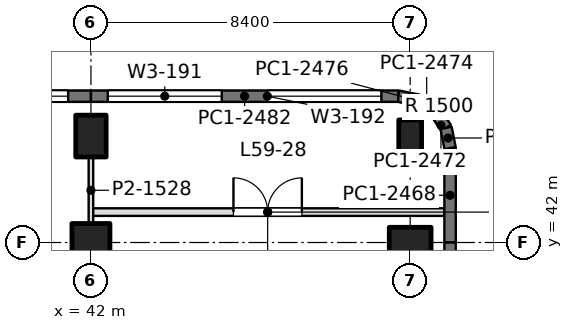
"""IFC4 building model, lengths in metres.
Left out: names, types, materials, properties, quantities, classifications, styles, units other than length and angle.
Written with IfcOpenShell. Run it as: python <this file> out.ifc"""

import sys

from ifc_helpers import new_model, si_unit, direction, frame, frame_2d, origin, origin_2d, place, context, subcontext, project, spatial, rectangle, extrude, element, fill, save


model = new_model("IFC4")
c1 = context("Model", 3, precision=1e-05, world=origin(), true_north=direction((0.0, 1.0)))
c2 = subcontext(c1, "Body", "Model", "MODEL_VIEW")
j1 = project(units=[si_unit("LENGTHUNIT", "METRE"), si_unit("PLANEANGLEUNIT", "RADIAN")], contexts=[c1])
p1 = place(None, origin())
s1 = spatial("IfcSite", under=j1, at=p1, CompositionType="ELEMENT")
p2 = place(p1, origin())
s2 = spatial("IfcBuilding", under=s1, at=p2, CompositionType="ELEMENT")
p3 = place(p2, frame((0.0, 0.0, 259.2)))
s3 = spatial("IfcBuildingStorey", under=s2, at=p3, CompositionType="ELEMENT", Elevation=259.2)
p4 = place(p3, frame((42.0, 42.0, 0.0), z_axis=(0.0, 0.0, 1.0), x_axis=(1.0, 0.0, 0.0)))
e1 = element("IfcColumn", 1, at=p4, inside=s3, PredefinedType="COLUMN", context=c2, shape_type="SweptSolid", body=[
    extrude(rectangle(XDim=1.0, YDim=1.0, at=origin_2d()), origin(), (0.0, 0.0, 1.0), 4.5),
])
for number, where, z_axis, x_axis in (
    (2, (42.0, 44.8, 0.0), (0.0, 0.0, 1.0), (1.0, 0.0, 0.0)),
    (3, (50.4, 42.0, 0.0), (0.0, 0.0, 1.0), (0.0, 1.0, 0.0)),
):
    element("IfcColumn", number, at=place(p3, frame(where, z_axis=z_axis, x_axis=x_axis)), inside=s3, PredefinedType="COLUMN", context=c2, shape_type="SweptSolid", body=[
        extrude(rectangle(XDim=0.8, YDim=1.1, at=origin_2d()), origin(), (0.0, 0.0, 1.0), 4.5),
    ])
p5 = place(p3, frame((50.4, 44.8, 0.0), z_axis=(0.0, 0.0, 1.0), x_axis=(1.0, 0.0, 0.0)))
e4 = element("IfcColumn", 4, at=p5, inside=s3, PredefinedType="COLUMN", context=c2, shape_type="SweptSolid", body=[
    extrude(rectangle(XDim=0.6, YDim=0.85, at=origin_2d()), origin(), (0.0, 0.0, 1.0), 4.5),
])
p6 = place(p3, frame((33.6, 45.85, 0.0), z_axis=(0.0, 0.0, 1.0), x_axis=(1.0, 0.0, 0.0)))
e5 = element("IfcWall", 5, at=p6, inside=s3, PredefinedType="SOLIDWALL", context=c2, shape_type="SweptSolid", body=[
    extrude(rectangle(XDim=8.4, YDim=0.3, at=frame_2d((4.2, 0.0))), origin(), (0.0, 0.0, 1.0), 4.35),
])
p7 = place(p6, frame((0.6, 0.0, 0.9)))
e6 = element("IfcOpeningElement", 6, at=p7, cuts=e5, PredefinedType="OPENING", context=c2, shape_type="SweptSolid", body=[
    extrude(rectangle(XDim=3.0, YDim=2.4, at=frame_2d((1.5, 1.2))), frame((0.0, 0.16, 0.0), z_axis=(0.0, -1.0, 0.0), x_axis=(1.0, 0.0, 0.0)), (0.0, 0.0, 1.0), 0.32),
])
p8 = place(p6, frame((4.8, 0.0, 0.9)))
e7 = element("IfcOpeningElement", 7, at=p8, cuts=e5, PredefinedType="OPENING", context=c2, shape_type="SweptSolid", body=[
    extrude(rectangle(XDim=3.0, YDim=2.4, at=frame_2d((1.5, 1.2))), frame((0.0, 0.16, 0.0), z_axis=(0.0, -1.0, 0.0), x_axis=(1.0, 0.0, 0.0)), (0.0, 0.0, 1.0), 0.32),
])
p9 = place(p3, frame((42.0, 45.85, 0.0), z_axis=(0.0, 0.0, 1.0), x_axis=(1.0, 0.0, 0.0)))
e8 = element("IfcWall", 8, at=p9, inside=s3, PredefinedType="SOLIDWALL", context=c2, shape_type="SweptSolid", body=[
    extrude(rectangle(XDim=8.085, YDim=0.3, at=frame_2d((4.042, 0.0))), origin(), (0.0, 0.0, 1.0), 4.35),
])
p10 = place(p9, frame((0.443, 0.0, 0.9)))
e9 = element("IfcOpeningElement", 9, at=p10, cuts=e8, PredefinedType="OPENING", context=c2, shape_type="SweptSolid", body=[
    extrude(rectangle(XDim=3.0, YDim=2.4, at=frame_2d((1.5, 1.2))), frame((0.0, 0.16, 0.0), z_axis=(0.0, -1.0, 0.0), x_axis=(1.0, 0.0, 0.0)), (0.0, 0.0, 1.0), 0.32),
])
p11 = place(p9, frame((4.643, 0.0, 0.9)))
e10 = element("IfcOpeningElement", 10, at=p11, cuts=e8, PredefinedType="OPENING", context=c2, shape_type="SweptSolid", body=[
    extrude(rectangle(XDim=3.0, YDim=2.4, at=frame_2d((1.5, 1.2))), frame((0.0, 0.16, 0.0), z_axis=(0.0, -1.0, 0.0), x_axis=(1.0, 0.0, 0.0)), (0.0, 0.0, 1.0), 0.32),
])
p12 = place(p3, frame((50.085, 45.85, 0.0), z_axis=(0.0, 0.0, 1.0), x_axis=(0.980702050465, -0.1955082817, 0.0)))
e11 = element("IfcWall", 11, at=p12, inside=s3, PredefinedType="SOLIDWALL", context=c2, shape_type="SweptSolid", body=[
    extrude(rectangle(XDim=0.541, YDim=0.3, at=frame_2d((0.271, 0.0))), origin(), (0.0, 0.0, 1.0), 4.35),
])
p13 = place(p3, frame((50.615, 45.744, 0.0), z_axis=(0.0, 0.0, 1.0), x_axis=(0.831692711774, -0.555236195849, 0.0)))
e12 = element("IfcWall", 12, at=p13, inside=s3, PredefinedType="SOLIDWALL", context=c2, shape_type="SweptSolid", body=[
    extrude(rectangle(XDim=0.525, YDim=0.3, at=frame_2d((0.263, 0.0))), origin(), (0.0, 0.0, 1.0), 4.35),
])
p14 = place(p3, frame((51.052, 45.453, 0.0), z_axis=(0.0, 0.0, 1.0), x_axis=(0.55534295404, -0.831621430339, 0.0)))
e13 = element("IfcWall", 13, at=p14, inside=s3, PredefinedType="SOLIDWALL", context=c2, shape_type="SweptSolid", body=[
    extrude(rectangle(XDim=0.526, YDim=0.3, at=frame_2d((0.263, 0.0))), origin(), (0.0, 0.0, 1.0), 4.35),
])
p15 = place(p3, frame((51.344, 45.015, 0.0), z_axis=(0.0, 0.0, 1.0), x_axis=(0.195073962632, -0.980788534345, 0.0)))
e14 = element("IfcWall", 14, at=p15, inside=s3, PredefinedType="SOLIDWALL", context=c2, shape_type="SweptSolid", body=[
    extrude(rectangle(XDim=0.541, YDim=0.3, at=frame_2d((0.271, 0.0))), origin(), (0.0, 0.0, 1.0), 4.35),
])
p16 = place(p3, frame((51.45, 44.485, 0.0), z_axis=(0.0, 0.0, 1.0), x_axis=(0.0, -1.0, 0.0)))
e15 = element("IfcWall", 15, at=p16, inside=s3, PredefinedType="SOLIDWALL", context=c2, shape_type="SweptSolid", body=[
    extrude(rectangle(XDim=2.485, YDim=0.3, at=frame_2d((1.243, 0.0))), origin(), (0.0, 0.0, 1.0), 4.35),
])
p17 = place(p3, frame((51.45, 42.0, 0.0), z_axis=(0.0, 0.0, 1.0), x_axis=(0.0, -1.0, 0.0)))
e16 = element("IfcWall", 16, at=p17, inside=s3, PredefinedType="SOLIDWALL", context=c2, shape_type="SweptSolid", body=[
    extrude(rectangle(XDim=4.35, YDim=0.3, at=frame_2d((2.175, 0.0))), origin(), (0.0, 0.0, 1.0), 4.35),
])
p18 = place(p17, frame((0.975, 0.0, 0.9)))
e17 = element("IfcOpeningElement", 17, at=p18, cuts=e16, PredefinedType="OPENING", context=c2, shape_type="SweptSolid", body=[
    extrude(rectangle(XDim=2.4, YDim=1.9, at=frame_2d((1.2, 0.95))), frame((0.0, 0.16, 0.0), z_axis=(0.0, -1.0, 0.0), x_axis=(1.0, 0.0, 0.0)), (0.0, 0.0, 1.0), 0.32),
])
p19 = place(p3, frame((42.0, 42.8, 0.0), z_axis=(0.0, 0.0, 1.0), x_axis=(1.0, 0.0, 0.0)))
e18 = element("IfcWall", 18, at=p19, inside=s3, PredefinedType="PARTITIONING", context=c2, shape_type="SweptSolid", body=[
    extrude(rectangle(XDim=9.302, YDim=0.2, at=frame_2d((4.651, 0.0))), origin(), (0.0, 0.0, 1.0), 3.86),
])
p20 = place(p19, frame((3.75, 0.0, 0.0)))
e19 = element("IfcOpeningElement", 19, at=p20, cuts=e18, PredefinedType="OPENING", context=c2, shape_type="SweptSolid", body=[
    extrude(rectangle(XDim=1.8, YDim=2.2, at=frame_2d((0.9, 1.1))), frame((0.0, 0.11, 0.0), z_axis=(0.0, -1.0, 0.0), x_axis=(1.0, 0.0, 0.0)), (0.0, 0.0, 1.0), 0.22),
])
p21 = place(p3, frame((42.0, 42.498, 0.0), z_axis=(0.0, 0.0, 1.0), x_axis=(0.0, 1.0, 0.0)))
e20 = element("IfcWall", 20, at=p21, inside=s3, PredefinedType="PARTITIONING", context=c2, shape_type="SweptSolid", body=[
    extrude(rectangle(XDim=1.753, YDim=0.12, at=frame_2d((0.876, 0.0))), origin(), (0.0, 0.0, 1.0), 3.99),
])
p22 = place(p8, origin())
e21 = element("IfcWindow", 21, at=p22, inside=s3, PartitioningType="SINGLE_PANEL", PredefinedType="WINDOW", context=c2, shape_type="SweptSolid", body=[
    extrude(rectangle(XDim=3.0, YDim=2.4, at=frame_2d((1.5, 1.2))), frame((0.0, 0.03, 0.0), z_axis=(0.0, -1.0, 0.0), x_axis=(1.0, 0.0, 0.0)), (0.0, 0.0, 1.0), 0.06),
])
fill(e7, e21)
p23 = place(p10, origin())
e22 = element("IfcWindow", 22, at=p23, inside=s3, PartitioningType="SINGLE_PANEL", PredefinedType="WINDOW", context=c2, shape_type="SweptSolid", body=[
    extrude(rectangle(XDim=3.0, YDim=2.4, at=frame_2d((1.5, 1.2))), frame((0.0, 0.03, 0.0), z_axis=(0.0, -1.0, 0.0), x_axis=(1.0, 0.0, 0.0)), (0.0, 0.0, 1.0), 0.06),
])
fill(e9, e22)
p24 = place(p11, origin())
e23 = element("IfcWindow", 23, at=p24, inside=s3, PartitioningType="SINGLE_PANEL", PredefinedType="WINDOW", context=c2, shape_type="SweptSolid", body=[
    extrude(rectangle(XDim=3.0, YDim=2.4, at=frame_2d((1.5, 1.2))), frame((0.0, 0.03, 0.0), z_axis=(0.0, -1.0, 0.0), x_axis=(1.0, 0.0, 0.0)), (0.0, 0.0, 1.0), 0.06),
])
fill(e10, e23)
p25 = place(p20, origin())
e24 = element("IfcDoor", 24, at=p25, inside=s3, OperationType="DOUBLE_DOOR_SINGLE_SWING", PredefinedType="DOOR", context=c2, shape_type="SweptSolid", body=[
    extrude(rectangle(XDim=1.8, YDim=2.2, at=frame_2d((0.9, 1.1))), frame((0.0, 0.025, 0.0), z_axis=(0.0, -1.0, 0.0), x_axis=(1.0, 0.0, 0.0)), (0.0, 0.0, 1.0), 0.05),
])
fill(e19, e24)
save(model, sys.argv[1])
